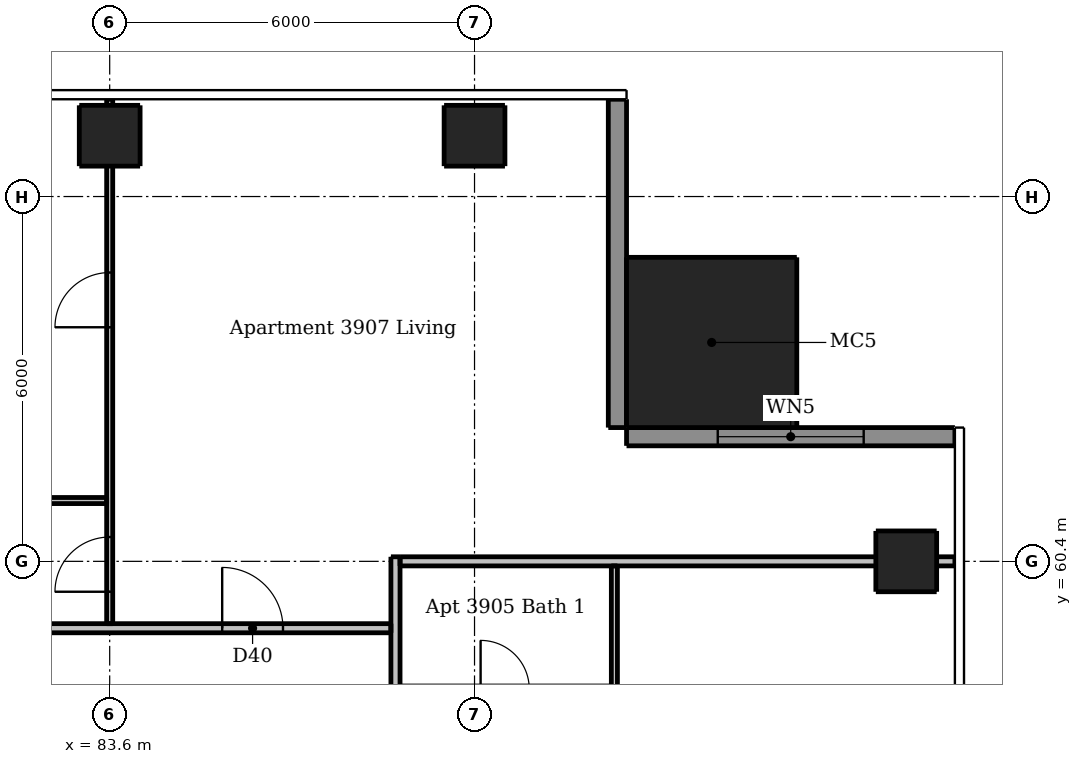
"""IFC4 building model, lengths in metres.
Left out: names, types, materials, properties, quantities, classifications, styles, units other than length and angle.
Written with IfcOpenShell. Run it as: python <this file> out.ifc"""

import sys

from ifc_helpers import new_model, si_unit, direction, frame, frame_2d, origin, origin_2d, place, context, subcontext, project, spatial, rectangle, extrude, element, fill, save


model = new_model("IFC4")
c1 = context("Model", 3, precision=1e-05, world=origin(), true_north=direction((0.0, 1.0)))
c2 = subcontext(c1, "Body", "Model", "MODEL_VIEW")
j1 = project(units=[si_unit("LENGTHUNIT", "METRE"), si_unit("PLANEANGLEUNIT", "RADIAN")], contexts=[c1])
p1 = place(None, origin())
s1 = spatial("IfcSite", under=j1, at=p1, CompositionType="ELEMENT")
p2 = place(p1, origin())
s2 = spatial("IfcBuilding", under=s1, at=p2, CompositionType="ELEMENT")
p3 = place(p2, frame((0.0, 0.0, 147.1)))
s3 = spatial("IfcBuildingStorey", under=s2, at=p3, CompositionType="ELEMENT", Elevation=147.1)
for number, where, z_axis, x_axis in (
    (1, (96.7, 60.4, 0.0), (0.0, 0.0, 1.0), (1.0, 0.0, 0.0)),
    (2, (83.6, 67.4, 0.0), (0.0, 0.0, 1.0), (1.0, 0.0, 0.0)),
    (3, (89.6, 67.4, 0.0), (0.0, 0.0, 1.0), (1.0, 0.0, 0.0)),
):
    element("IfcColumn", number, at=place(p3, frame(where, z_axis=z_axis, x_axis=x_axis)), inside=s3, PredefinedType="COLUMN", context=c2, shape_type="SweptSolid", body=[
        extrude(rectangle(XDim=1.0, YDim=1.0, at=origin_2d()), origin(), (0.0, 0.0, 1.0), 3.0),
    ])
p4 = place(p3, frame((93.5, 64.0, 0.0), z_axis=(0.0, 0.0, 1.0), x_axis=(1.0, 0.0, 0.0)))
e4 = element("IfcColumn", 4, at=p4, inside=s3, PredefinedType="COLUMN", context=c2, shape_type="SweptSolid", body=[
    extrude(rectangle(XDim=2.8, YDim=2.8, at=origin_2d()), origin(), (0.0, 0.0, 1.0), 3.3),
])
p5 = place(p3, frame((97.5, 62.45, 0.0), z_axis=(0.0, 0.0, 1.0), x_axis=(-1.0, 0.0, 0.0)))
e5 = element("IfcWall", 5, at=p5, inside=s3, PredefinedType="SOLIDWALL", context=c2, shape_type="SweptSolid", body=[
    extrude(rectangle(XDim=5.4, YDim=0.3, at=frame_2d((2.7, 0.0))), origin(), (0.0, 0.0, 1.0), 3.0),
])
p6 = place(p5, frame((1.5, 0.0, 0.15)))
e6 = element("IfcOpeningElement", 6, at=p6, cuts=e5, PredefinedType="OPENING", context=c2, shape_type="SweptSolid", body=[
    extrude(rectangle(XDim=2.4, YDim=2.1, at=frame_2d((1.2, 1.05))), frame((0.0, 0.16, 0.0), z_axis=(0.0, -1.0, 0.0), x_axis=(1.0, 0.0, 0.0)), (0.0, 0.0, 1.0), 0.32),
])
p7 = place(p3, frame((91.95, 62.6, 0.0), z_axis=(0.0, 0.0, 1.0), x_axis=(0.0, 1.0, 0.0)))
e7 = element("IfcWall", 7, at=p7, inside=s3, PredefinedType="SOLIDWALL", context=c2, shape_type="SweptSolid", body=[
    extrude(rectangle(XDim=5.4, YDim=0.3, at=frame_2d((2.7, 0.0))), origin(), (0.0, 0.0, 1.0), 3.0),
])
p8 = place(p3, frame((83.6, 59.375, 0.0), z_axis=(0.0, 0.0, 1.0), x_axis=(0.0, 1.0, 0.0)))
e8 = element("IfcWall", 8, at=p8, inside=s3, PredefinedType="PARTITIONING", context=c2, shape_type="SweptSolid", body=[
    extrude(rectangle(XDim=8.625, YDim=0.1, at=frame_2d((4.312, 0.0))), origin(), (0.0, 0.0, 1.0), 2.466),
])
p9 = place(p8, frame((0.525, 0.0, 0.0)))
e9 = element("IfcOpeningElement", 9, at=p9, cuts=e8, PredefinedType="OPENING", context=c2, shape_type="SweptSolid", body=[
    extrude(rectangle(XDim=0.9, YDim=2.1, at=frame_2d((0.45, 1.05))), frame((0.0, 0.06, 0.0), z_axis=(0.0, -1.0, 0.0), x_axis=(1.0, 0.0, 0.0)), (0.0, 0.0, 1.0), 0.12),
])
p10 = place(p8, frame((4.875, 0.0, 0.0)))
e10 = element("IfcOpeningElement", 10, at=p10, cuts=e8, PredefinedType="OPENING", context=c2, shape_type="SweptSolid", body=[
    extrude(rectangle(XDim=0.9, YDim=2.1, at=frame_2d((0.45, 1.05))), frame((0.0, 0.06, 0.0), z_axis=(0.0, -1.0, 0.0), x_axis=(1.0, 0.0, 0.0)), (0.0, 0.0, 1.0), 0.12),
])
p11 = place(p3, frame((91.9, 58.25, 0.0), z_axis=(0.0, 0.0, 1.0), x_axis=(0.0, 1.0, 0.0)))
e11 = element("IfcWall", 11, at=p11, inside=s3, PredefinedType="PARTITIONING", context=c2, shape_type="SweptSolid", body=[
    extrude(rectangle(XDim=2.075, YDim=0.1, at=frame_2d((1.038, 0.0))), origin(), (0.0, 0.0, 1.0), 3.0),
])
p12 = place(p3, frame((83.55, 61.4, 0.0), z_axis=(0.0, 0.0, 1.0), x_axis=(-1.0, 0.0, 0.0)))
e12 = element("IfcWall", 12, at=p12, inside=s3, PredefinedType="PARTITIONING", context=c2, shape_type="SweptSolid", body=[
    extrude(rectangle(XDim=5.875, YDim=0.1, at=frame_2d((2.938, 0.0))), origin(), (0.0, 0.0, 1.0), 3.0),
])
p13 = place(p12, frame((3.75, 0.0, 0.0)))
e13 = element("IfcOpeningElement", 13, at=p13, cuts=e12, PredefinedType="OPENING", context=c2, shape_type="SweptSolid", body=[
    extrude(rectangle(XDim=0.8, YDim=2.1, at=frame_2d((0.4, 1.05))), frame((0.0, 0.06, 0.0), z_axis=(0.0, -1.0, 0.0), x_axis=(1.0, 0.0, 0.0)), (0.0, 0.0, 1.0), 0.12),
])
p14 = place(p3, frame((88.3, 60.475, 0.0), z_axis=(0.0, 0.0, 1.0), x_axis=(0.0, -1.0, 0.0)))
e14 = element("IfcWall", 14, at=p14, inside=s3, PredefinedType="PARTITIONING", context=c2, shape_type="SweptSolid", body=[
    extrude(rectangle(XDim=28.7, YDim=0.15, at=frame_2d((14.35, 0.0))), origin(), (0.0, 0.0, 1.0), 3.0),
])
p15 = place(p14, frame((27.425, 0.0, 0.0)))
e15 = element("IfcOpeningElement", 15, at=p15, cuts=e14, PredefinedType="OPENING", context=c2, shape_type="SweptSolid", body=[
    extrude(rectangle(XDim=1.0, YDim=2.1, at=frame_2d((0.5, 1.05))), frame((0.0, 0.085, 0.0), z_axis=(0.0, -1.0, 0.0), x_axis=(1.0, 0.0, 0.0)), (0.0, 0.0, 1.0), 0.17),
])
p16 = place(p14, frame((13.075, 0.0, 0.0)))
e16 = element("IfcOpeningElement", 16, at=p16, cuts=e14, PredefinedType="OPENING", context=c2, shape_type="SweptSolid", body=[
    extrude(rectangle(XDim=1.0, YDim=2.1, at=frame_2d((0.5, 1.05))), frame((0.0, 0.085, 0.0), z_axis=(0.0, -1.0, 0.0), x_axis=(1.0, 0.0, 0.0)), (0.0, 0.0, 1.0), 0.17),
])
p17 = place(p14, frame((2.575, 0.0, 0.0)))
e17 = element("IfcOpeningElement", 17, at=p17, cuts=e14, PredefinedType="OPENING", context=c2, shape_type="SweptSolid", body=[
    extrude(rectangle(XDim=1.0, YDim=2.1, at=frame_2d((0.5, 1.05))), frame((0.0, 0.085, 0.0), z_axis=(0.0, -1.0, 0.0), x_axis=(1.0, 0.0, 0.0)), (0.0, 0.0, 1.0), 0.17),
])
p18 = place(p3, frame((88.375, 60.4, 0.0), z_axis=(0.0, 0.0, 1.0), x_axis=(1.0, 0.0, 0.0)))
e18 = element("IfcWall", 18, at=p18, inside=s3, PredefinedType="PARTITIONING", context=c2, shape_type="SweptSolid", body=[
    extrude(rectangle(XDim=9.125, YDim=0.15, at=frame_2d((4.562, 0.0))), origin(), (0.0, 0.0, 1.0), 2.597),
])
p19 = place(p3, frame((59.675, 59.3, 0.0), z_axis=(0.0, 0.0, 1.0), x_axis=(1.0, 0.0, 0.0)))
e19 = element("IfcWall", 19, at=p19, inside=s3, PredefinedType="PARTITIONING", context=c2, shape_type="SweptSolid", body=[
    extrude(rectangle(XDim=28.55, YDim=0.15, at=frame_2d((14.275, 0.0))), origin(), (0.0, 0.0, 1.0), 3.0),
])
p20 = place(p19, frame((8.975, 0.0, 0.0)))
e20 = element("IfcOpeningElement", 20, at=p20, cuts=e19, PredefinedType="OPENING", context=c2, shape_type="SweptSolid", body=[
    extrude(rectangle(XDim=1.0, YDim=2.1, at=frame_2d((0.5, 1.05))), frame((0.0, 0.085, 0.0), z_axis=(0.0, -1.0, 0.0), x_axis=(1.0, 0.0, 0.0)), (0.0, 0.0, 1.0), 0.17),
])
p21 = place(p19, frame((25.775, 0.0, 0.0)))
e21 = element("IfcOpeningElement", 21, at=p21, cuts=e19, PredefinedType="OPENING", context=c2, shape_type="SweptSolid", body=[
    extrude(rectangle(XDim=1.0, YDim=2.1, at=frame_2d((0.5, 1.05))), frame((0.0, 0.085, 0.0), z_axis=(0.0, -1.0, 0.0), x_axis=(1.0, 0.0, 0.0)), (0.0, 0.0, 1.0), 0.17),
])
p22 = place(p6, origin())
e22 = element("IfcWindow", 22, at=p22, inside=s3, PartitioningType="DOUBLE_PANEL_VERTICAL", PredefinedType="WINDOW", context=c2, shape_type="SweptSolid", body=[
    extrude(rectangle(XDim=2.4, YDim=2.1, at=frame_2d((1.2, 1.05))), frame((0.0, 0.03, 0.0), z_axis=(0.0, -1.0, 0.0), x_axis=(1.0, 0.0, 0.0)), (0.0, 0.0, 1.0), 0.06),
])
fill(e6, e22)
p23 = place(p21, origin())
e23 = element("IfcDoor", 23, at=p23, inside=s3, OperationType="SINGLE_SWING_LEFT", PredefinedType="DOOR", context=c2, shape_type="SweptSolid", body=[
    extrude(rectangle(XDim=1.0, YDim=2.1, at=frame_2d((0.5, 1.05))), frame((0.0, 0.025, 0.0), z_axis=(0.0, -1.0, 0.0), x_axis=(1.0, 0.0, 0.0)), (0.0, 0.0, 1.0), 0.05),
])
fill(e21, e23)
p24 = place(p9, origin())
e24 = element("IfcDoor", 24, at=p24, inside=s3, OperationType="SINGLE_SWING_LEFT", PredefinedType="DOOR", context=c2, shape_type="SweptSolid", body=[
    extrude(rectangle(XDim=0.9, YDim=2.1, at=frame_2d((0.45, 1.05))), frame((0.0, 0.025, 0.0), z_axis=(0.0, -1.0, 0.0), x_axis=(1.0, 0.0, 0.0)), (0.0, 0.0, 1.0), 0.05),
])
fill(e9, e24)
p25 = place(p10, origin())
e25 = element("IfcDoor", 25, at=p25, inside=s3, OperationType="SINGLE_SWING_LEFT", PredefinedType="DOOR", context=c2, shape_type="SweptSolid", body=[
    extrude(rectangle(XDim=0.9, YDim=2.1, at=frame_2d((0.45, 1.05))), frame((0.0, 0.025, 0.0), z_axis=(0.0, -1.0, 0.0), x_axis=(1.0, 0.0, 0.0)), (0.0, 0.0, 1.0), 0.05),
])
fill(e10, e25)
save(model, sys.argv[1])
